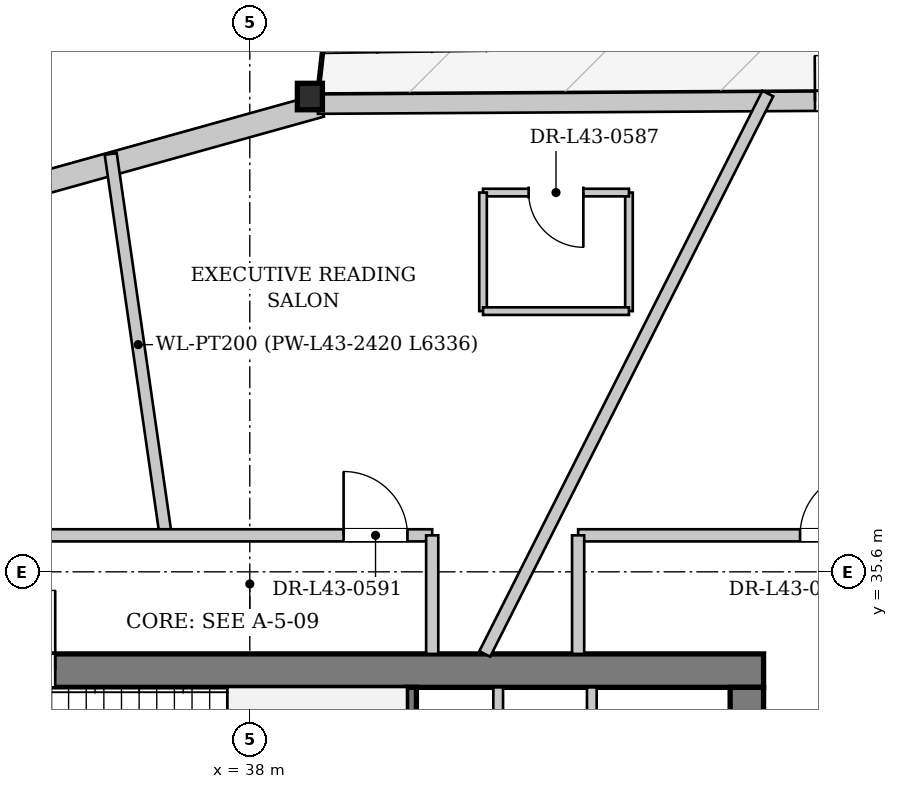
"""IFC4 building model, lengths in metres.
Left out: names, types, materials, properties, quantities, classifications, styles, units other than length and angle.
Written with IfcOpenShell. Run it as: python <this file> out.ifc"""

import sys

from ifc_helpers import new_model, si_unit, direction, frame, frame_2d, origin, origin_2d, place, context, subcontext, project, spatial, rectangle, i_section, extrude, source, transform, mapped, element, fill, save


model = new_model("IFC4")
c1 = context("Model", 3, precision=1e-05, world=origin(), true_north=direction((0.0, 1.0)))
c2 = subcontext(c1, "Body", "Model", "MODEL_VIEW")
j1 = project(units=[si_unit("LENGTHUNIT", "METRE"), si_unit("PLANEANGLEUNIT", "RADIAN")], contexts=[c1])
p1 = place(None, origin())
s1 = spatial("IfcSite", under=j1, at=p1, CompositionType="ELEMENT")
p2 = place(p1, origin())
s2 = spatial("IfcBuilding", under=s1, at=p2, CompositionType="ELEMENT")
p3 = place(p2, frame((0.0, 0.0, 164.35)))
s3 = spatial("IfcBuildingStorey", under=s2, at=p3, CompositionType="ELEMENT", Elevation=164.35)
m1 = source(origin(), c2, "Body", "SweptSolid", [
    extrude(i_section(OverallWidth=0.412, OverallDepth=0.435, WebThickness=0.031, FlangeThickness=0.05, at=origin_2d()), origin(), (0.0, 0.0, 1.0), 3.396),
])
p4 = place(p3, frame((39.119, 43.452, 0.0), z_axis=(-0.076712698826, -0.020921645134, 0.996833710608), x_axis=(0.263117405792, -0.964763821238, 0.0)))
e1 = element("IfcColumn", 1, at=p4, inside=s3, PredefinedType="COLUMN", context=c2, shape_type="MappedRepresentation", body=[
    mapped(m1, transform((0.0, 0.0, 0.0), x_axis=(1.0, 0.0, 0.0), y_axis=(0.0, 1.0, 0.0), z_axis=(0.0, 0.0, 1.0), scale=1.0)),
])
p5 = place(p3, frame((17.117, 37.123, 0.0), z_axis=(0.0, 0.0, 1.0), x_axis=(0.963294352917, 0.268447368468, 0.0)))
e2 = element("IfcWall", 2, at=p5, inside=s3, PredefinedType="SOLIDWALL", context=c2, shape_type="SweptSolid", body=[
    extrude(rectangle(XDim=22.893, YDim=0.38, at=frame_2d((11.446, 0.0))), origin(), (0.0, 0.0, 1.0), 2.722),
])
p6 = place(p5, frame((5.31, 0.0, 0.352)))
e3 = element("IfcOpeningElement", 3, at=p6, cuts=e2, PredefinedType="OPENING", context=c2, shape_type="SweptSolid", body=[
    extrude(rectangle(XDim=2.2, YDim=2.25, at=frame_2d((1.1, 1.125))), frame((0.0, 0.2, 0.0), z_axis=(0.0, -1.0, 0.0), x_axis=(1.0, 0.0, 0.0)), (0.0, 0.0, 1.0), 0.4),
])
p7 = place(p5, frame((15.383, 0.0, 0.352)))
e4 = element("IfcOpeningElement", 4, at=p7, cuts=e2, PredefinedType="OPENING", context=c2, shape_type="SweptSolid", body=[
    extrude(rectangle(XDim=2.2, YDim=2.25, at=frame_2d((1.1, 1.125))), frame((0.0, 0.2, 0.0), z_axis=(0.0, -1.0, 0.0), x_axis=(1.0, 0.0, 0.0)), (0.0, 0.0, 1.0), 0.4),
])
p8 = place(p3, frame((39.12, 43.292, 0.0), z_axis=(0.0, 0.0, 1.0), x_axis=(0.999982860289, 0.005854837953, 0.0)))
e5 = element("IfcWall", 5, at=p8, inside=s3, PredefinedType="SOLIDWALL", context=c2, shape_type="SweptSolid", body=[
    extrude(rectangle(XDim=22.893, YDim=0.32, at=frame_2d((11.446, 0.0))), origin(), (0.0, 0.0, 1.0), 2.722),
])
p9 = place(p8, frame((8.176, 0.0, 0.0)))
e6 = element("IfcOpeningElement", 6, at=p9, cuts=e5, PredefinedType="OPENING", context=c2, shape_type="SweptSolid", body=[
    extrude(rectangle(XDim=1.5, YDim=2.3, at=frame_2d((0.75, 1.15))), frame((0.0, 0.17, 0.0), z_axis=(0.0, -1.0, 0.0), x_axis=(1.0, 0.0, 0.0)), (0.0, 0.0, 1.0), 0.34),
])
p10 = place(p8, frame((15.641, 0.0, 0.252)))
e7 = element("IfcOpeningElement", 7, at=p10, cuts=e5, PredefinedType="OPENING", context=c2, shape_type="SweptSolid", body=[
    extrude(rectangle(XDim=2.6, YDim=2.35, at=frame_2d((1.3, 1.175))), frame((0.0, 0.17, 0.0), z_axis=(0.0, -1.0, 0.0), x_axis=(1.0, 0.0, 0.0)), (0.0, 0.0, 1.0), 0.34),
])
p11 = place(p3, frame((29.55, 33.975, 0.0), z_axis=(0.0, 0.0, 1.0), x_axis=(1.0, 0.0, 0.0)))
e8 = element("IfcWall", 8, at=p11, inside=s3, PredefinedType="SHEAR", context=c2, shape_type="SweptSolid", body=[
    extrude(rectangle(XDim=16.9, YDim=0.55, at=frame_2d((8.45, 0.0))), origin(), (0.0, 0.0, 1.0), 3.33),
])
p12 = place(p11, frame((1.55, 0.0, 0.0)))
e9 = element("IfcOpeningElement", 9, at=p12, cuts=e8, PredefinedType="OPENING", context=c2, shape_type="SweptSolid", body=[
    extrude(rectangle(XDim=0.95, YDim=2.1, at=frame_2d((0.475, 1.05))), frame((0.0, 0.285, 0.0), z_axis=(0.0, -1.0, 0.0), x_axis=(1.0, 0.0, 0.0)), (0.0, 0.0, 1.0), 0.57),
])
p13 = place(p11, frame((3.93, 0.0, 0.0)))
e10 = element("IfcOpeningElement", 10, at=p13, cuts=e8, PredefinedType="OPENING", context=c2, shape_type="SweptSolid", body=[
    extrude(rectangle(XDim=1.32, YDim=2.2, at=frame_2d((0.66, 1.1))), frame((0.0, 0.285, 0.0), z_axis=(0.0, -1.0, 0.0), x_axis=(1.0, 0.0, 0.0)), (0.0, 0.0, 1.0), 0.57),
])
p14 = place(p3, frame((46.175, 33.7, 0.0), z_axis=(0.0, 0.0, 1.0), x_axis=(0.0, -1.0, 0.0)))
e11 = element("IfcWall", 11, at=p14, inside=s3, PredefinedType="SHEAR", context=c2, shape_type="SweptSolid", body=[
    extrude(rectangle(XDim=14.2, YDim=0.55, at=frame_2d((7.1, 0.0))), origin(), (0.0, 0.0, 1.0), 3.33),
])
p15 = place(p14, frame((5.18, 0.0, 0.0)))
e12 = element("IfcOpeningElement", 12, at=p15, cuts=e11, PredefinedType="OPENING", context=c2, shape_type="SweptSolid", body=[
    extrude(rectangle(XDim=1.6, YDim=2.2, at=frame_2d((0.8, 1.1))), frame((0.0, 0.285, 0.0), z_axis=(0.0, -1.0, 0.0), x_axis=(1.0, 0.0, 0.0)), (0.0, 0.0, 1.0), 0.57),
])
p16 = place(p14, frame((2.05, 0.0, 0.0)))
e13 = element("IfcOpeningElement", 13, at=p16, cuts=e11, PredefinedType="OPENING", context=c2, shape_type="SweptSolid", body=[
    extrude(rectangle(XDim=0.95, YDim=2.1, at=frame_2d((0.475, 1.05))), frame((0.0, 0.285, 0.0), z_axis=(0.0, -1.0, 0.0), x_axis=(1.0, 0.0, 0.0)), (0.0, 0.0, 1.0), 0.57),
])
p17 = place(p3, frame((40.66, 30.6, 0.0), z_axis=(0.0, 0.0, 1.0), x_axis=(0.0, 1.0, 0.0)))
e14 = element("IfcWall", 14, at=p17, inside=s3, PredefinedType="PARTITIONING", context=c2, shape_type="SweptSolid", body=[
    extrude(rectangle(XDim=3.1, YDim=0.16, at=frame_2d((1.55, 0.0))), origin(), (0.0, 0.0, 1.0), 3.33),
])
p18 = place(p3, frame((42.085, 30.68, 0.0), z_axis=(0.0, 0.0, 1.0), x_axis=(0.0, 1.0, 0.0)))
e15 = element("IfcWall", 15, at=p18, inside=s3, PredefinedType="PARTITIONING", context=c2, shape_type="SweptSolid", body=[
    extrude(rectangle(XDim=3.02, YDim=0.16, at=frame_2d((1.51, 0.0))), origin(), (0.0, 0.0, 1.0), 3.33),
])
p19 = place(p18, frame((0.95, 0.0, 0.0)))
e16 = element("IfcOpeningElement", 16, at=p19, cuts=e15, PredefinedType="OPENING", context=c2, shape_type="SweptSolid", body=[
    extrude(rectangle(XDim=0.95, YDim=2.1, at=frame_2d((0.475, 1.05))), frame((0.0, 0.09, 0.0), z_axis=(0.0, -1.0, 0.0), x_axis=(1.0, 0.0, 0.0)), (0.0, 0.0, 1.0), 0.18),
])
p20 = place(p3, frame((43.625, 30.68, 0.0), z_axis=(0.0, 0.0, 1.0), x_axis=(0.0, 1.0, 0.0)))
e17 = element("IfcWall", 17, at=p20, inside=s3, PredefinedType="PARTITIONING", context=c2, shape_type="SweptSolid", body=[
    extrude(rectangle(XDim=3.02, YDim=0.16, at=frame_2d((1.51, 0.0))), origin(), (0.0, 0.0, 1.0), 3.33),
])
p21 = place(p20, frame((0.95, 0.0, 0.0)))
e18 = element("IfcOpeningElement", 18, at=p21, cuts=e17, PredefinedType="OPENING", context=c2, shape_type="SweptSolid", body=[
    extrude(rectangle(XDim=0.95, YDim=2.1, at=frame_2d((0.475, 1.05))), frame((0.0, 0.09, 0.0), z_axis=(0.0, -1.0, 0.0), x_axis=(1.0, 0.0, 0.0)), (0.0, 0.0, 1.0), 0.18),
])
p22 = place(p3, frame((36.617, 36.2, 0.0), z_axis=(0.0, 0.0, 1.0), x_axis=(-0.142634918222, 0.989775368507, 0.0)))
e19 = element("IfcWall", 19, at=p22, inside=s3, PredefinedType="PARTITIONING", context=c2, shape_type="SweptSolid", body=[
    extrude(rectangle(XDim=6.336, YDim=0.2, at=frame_2d((3.168, 0.0))), origin(), (0.0, 0.0, 1.0), 3.33),
])
p23 = place(p3, frame((41.864, 34.25, 0.0), z_axis=(0.0, 0.0, 1.0), x_axis=(0.450889382552, 0.892579836598, 0.0)))
e20 = element("IfcWall", 20, at=p23, inside=s3, PredefinedType="PARTITIONING", context=c2, shape_type="SweptSolid", body=[
    extrude(rectangle(XDim=10.324, YDim=0.2, at=frame_2d((5.162, 0.0))), origin(), (0.0, 0.0, 1.0), 3.33),
])
p24 = place(p3, frame((44.236, 39.887, 0.0), z_axis=(0.0, 0.0, 1.0), x_axis=(0.0, 1.0, 0.0)))
e21 = element("IfcWall", 21, at=p24, inside=s3, PredefinedType="PARTITIONING", context=c2, shape_type="SweptSolid", body=[
    extrude(rectangle(XDim=1.95, YDim=0.125, at=frame_2d((0.975, 0.0))), origin(), (0.0, 0.0, 1.0), 3.33),
])
p25 = place(p3, frame((44.236, 41.837, 0.0), z_axis=(0.0, 0.0, 1.0), x_axis=(-1.0, 0.0, 0.0)))
e22 = element("IfcWall", 22, at=p25, inside=s3, PredefinedType="PARTITIONING", context=c2, shape_type="SweptSolid", body=[
    extrude(rectangle(XDim=2.4, YDim=0.125, at=frame_2d((1.2, 0.0))), origin(), (0.0, 0.0, 1.0), 3.33),
])
p26 = place(p25, frame((0.75, 0.0, 0.0)))
e23 = element("IfcOpeningElement", 23, at=p26, cuts=e22, PredefinedType="OPENING", context=c2, shape_type="SweptSolid", body=[
    extrude(rectangle(XDim=0.9, YDim=2.1, at=frame_2d((0.45, 1.05))), frame((0.0, 0.073, 0.0), z_axis=(0.0, -1.0, 0.0), x_axis=(1.0, 0.0, 0.0)), (0.0, 0.0, 1.0), 0.145),
])
p27 = place(p3, frame((41.836, 41.837, 0.0), z_axis=(0.0, 0.0, 1.0), x_axis=(0.0, -1.0, 0.0)))
e24 = element("IfcWall", 24, at=p27, inside=s3, PredefinedType="PARTITIONING", context=c2, shape_type="SweptSolid", body=[
    extrude(rectangle(XDim=1.95, YDim=0.125, at=frame_2d((0.975, 0.0))), origin(), (0.0, 0.0, 1.0), 3.33),
])
p28 = place(p3, frame((41.836, 39.887, 0.0), z_axis=(0.0, 0.0, 1.0), x_axis=(1.0, 0.0, 0.0)))
e25 = element("IfcWall", 25, at=p28, inside=s3, PredefinedType="PARTITIONING", context=c2, shape_type="SweptSolid", body=[
    extrude(rectangle(XDim=2.4, YDim=0.125, at=frame_2d((1.2, 0.0))), origin(), (0.0, 0.0, 1.0), 3.015),
])
p29 = place(p3, frame((27.6, 36.2, 0.0), z_axis=(0.0, 0.0, 1.0), x_axis=(1.0, 0.0, 0.0)))
e26 = element("IfcWall", 26, at=p29, inside=s3, PredefinedType="PARTITIONING", context=c2, shape_type="SweptSolid", body=[
    extrude(rectangle(XDim=13.4, YDim=0.2, at=frame_2d((6.7, 0.0))), origin(), (0.0, 0.0, 1.0), 3.33),
])
p30 = place(p29, frame((0.3, 0.0, 0.0)))
e27 = element("IfcOpeningElement", 27, at=p30, cuts=e26, PredefinedType="OPENING", context=c2, shape_type="SweptSolid", body=[
    extrude(rectangle(XDim=1.05, YDim=2.2, at=frame_2d((0.525, 1.1))), frame((0.0, 0.11, 0.0), z_axis=(0.0, -1.0, 0.0), x_axis=(1.0, 0.0, 0.0)), (0.0, 0.0, 1.0), 0.22),
])
p31 = place(p29, frame((11.943, 0.0, 0.0)))
e28 = element("IfcOpeningElement", 28, at=p31, cuts=e26, PredefinedType="OPENING", context=c2, shape_type="SweptSolid", body=[
    extrude(rectangle(XDim=1.05, YDim=2.2, at=frame_2d((0.525, 1.1))), frame((0.0, 0.11, 0.0), z_axis=(0.0, -1.0, 0.0), x_axis=(1.0, 0.0, 0.0)), (0.0, 0.0, 1.0), 0.22),
])
p32 = place(p3, frame((41.0, 34.25, 0.0), z_axis=(0.0, 0.0, 1.0), x_axis=(0.0, 1.0, 0.0)))
e29 = element("IfcWall", 29, at=p32, inside=s3, PredefinedType="PARTITIONING", context=c2, shape_type="SweptSolid", body=[
    extrude(rectangle(XDim=1.95, YDim=0.2, at=frame_2d((0.975, 0.0))), origin(), (0.0, 0.0, 1.0), 3.33),
])
p33 = place(p3, frame((43.4, 36.2, 0.0), z_axis=(0.0, 0.0, 1.0), x_axis=(1.0, 0.0, 0.0)))
e30 = element("IfcWall", 30, at=p33, inside=s3, PredefinedType="PARTITIONING", context=c2, shape_type="SweptSolid", body=[
    extrude(rectangle(XDim=5.0, YDim=0.2, at=frame_2d((2.5, 0.0))), origin(), (0.0, 0.0, 1.0), 3.33),
])
p34 = place(p33, frame((3.65, 0.0, 0.0)))
e31 = element("IfcOpeningElement", 31, at=p34, cuts=e30, PredefinedType="OPENING", context=c2, shape_type="SweptSolid", body=[
    extrude(rectangle(XDim=1.05, YDim=2.2, at=frame_2d((0.525, 1.1))), frame((0.0, 0.11, 0.0), z_axis=(0.0, -1.0, 0.0), x_axis=(1.0, 0.0, 0.0)), (0.0, 0.0, 1.0), 0.22),
])
p35 = place(p3, frame((43.4, 34.25, 0.0), z_axis=(0.0, 0.0, 1.0), x_axis=(0.0, 1.0, 0.0)))
e32 = element("IfcWall", 32, at=p35, inside=s3, PredefinedType="PARTITIONING", context=c2, shape_type="SweptSolid", body=[
    extrude(rectangle(XDim=1.95, YDim=0.2, at=frame_2d((0.975, 0.0))), origin(), (0.0, 0.0, 1.0), 3.33),
])
m2 = source(origin(), c2, "Body", "SweptSolid", [
    extrude(rectangle(XDim=1.5, YDim=2.3, at=frame_2d((0.75, 1.15))), frame((0.0, 0.025, 0.0), z_axis=(0.0, -1.0, 0.0), x_axis=(1.0, 0.0, 0.0)), (0.0, 0.0, 1.0), 0.05),
])
p36 = place(p9, origin())
e33 = element("IfcDoor", 33, at=p36, inside=s3, OperationType="DOUBLE_DOOR_SINGLE_SWING", PredefinedType="DOOR", context=c2, shape_type="MappedRepresentation", body=[
    mapped(m2, transform((0.0, 0.0, 0.0), x_axis=(1.0, 0.0, 0.0), y_axis=(0.0, 1.0, 0.0), z_axis=(0.0, 0.0, 1.0), scale=1.0)),
])
fill(e6, e33)
m3 = source(origin(), c2, "Body", "SweptSolid", [
    extrude(rectangle(XDim=1.32, YDim=2.2, at=frame_2d((0.66, 1.1))), frame((0.0, 0.025, 0.0), z_axis=(0.0, -1.0, 0.0), x_axis=(1.0, 0.0, 0.0)), (0.0, 0.0, 1.0), 0.05),
])
p37 = place(p13, origin())
e34 = element("IfcDoor", 34, at=p37, inside=s3, OperationType="SINGLE_SWING_RIGHT", PredefinedType="DOOR", context=c2, shape_type="MappedRepresentation", body=[
    mapped(m3, transform((0.0, 0.0, 0.0), x_axis=(1.0, 0.0, 0.0), y_axis=(0.0, 1.0, 0.0), z_axis=(0.0, 0.0, 1.0), scale=1.0)),
])
fill(e10, e34)
m4 = source(origin(), c2, "Body", "SweptSolid", [
    extrude(rectangle(XDim=0.9, YDim=2.1, at=frame_2d((0.45, 1.05))), frame((0.0, 0.025, 0.0), z_axis=(0.0, -1.0, 0.0), x_axis=(1.0, 0.0, 0.0)), (0.0, 0.0, 1.0), 0.05),
])
p38 = place(p26, origin())
e35 = element("IfcDoor", 35, at=p38, inside=s3, OperationType="SINGLE_SWING_LEFT", PredefinedType="DOOR", context=c2, shape_type="MappedRepresentation", body=[
    mapped(m4, transform((0.0, 0.0, 0.0), x_axis=(1.0, 0.0, 0.0), y_axis=(0.0, 1.0, 0.0), z_axis=(0.0, 0.0, 1.0), scale=1.0)),
])
fill(e23, e35)
m5 = source(origin(), c2, "Body", "SweptSolid", [
    extrude(rectangle(XDim=1.05, YDim=2.2, at=frame_2d((0.525, 1.1))), frame((0.0, 0.025, 0.0), z_axis=(0.0, -1.0, 0.0), x_axis=(1.0, 0.0, 0.0)), (0.0, 0.0, 1.0), 0.05),
])
p39 = place(p31, origin())
e36 = element("IfcDoor", 36, at=p39, inside=s3, OperationType="SINGLE_SWING_LEFT", PredefinedType="DOOR", context=c2, shape_type="MappedRepresentation", body=[
    mapped(m5, transform((0.0, 0.0, 0.0), x_axis=(1.0, 0.0, 0.0), y_axis=(0.0, 1.0, 0.0), z_axis=(0.0, 0.0, 1.0), scale=1.0)),
])
fill(e28, e36)
p40 = place(p34, origin())
e37 = element("IfcDoor", 37, at=p40, inside=s3, OperationType="SINGLE_SWING_RIGHT", PredefinedType="DOOR", context=c2, shape_type="MappedRepresentation", body=[
    mapped(m5, transform((0.0, 0.0, 0.0), x_axis=(1.0, 0.0, 0.0), y_axis=(0.0, 1.0, 0.0), z_axis=(0.0, 0.0, 1.0), scale=1.0)),
])
fill(e31, e37)
save(model, sys.argv[1])
